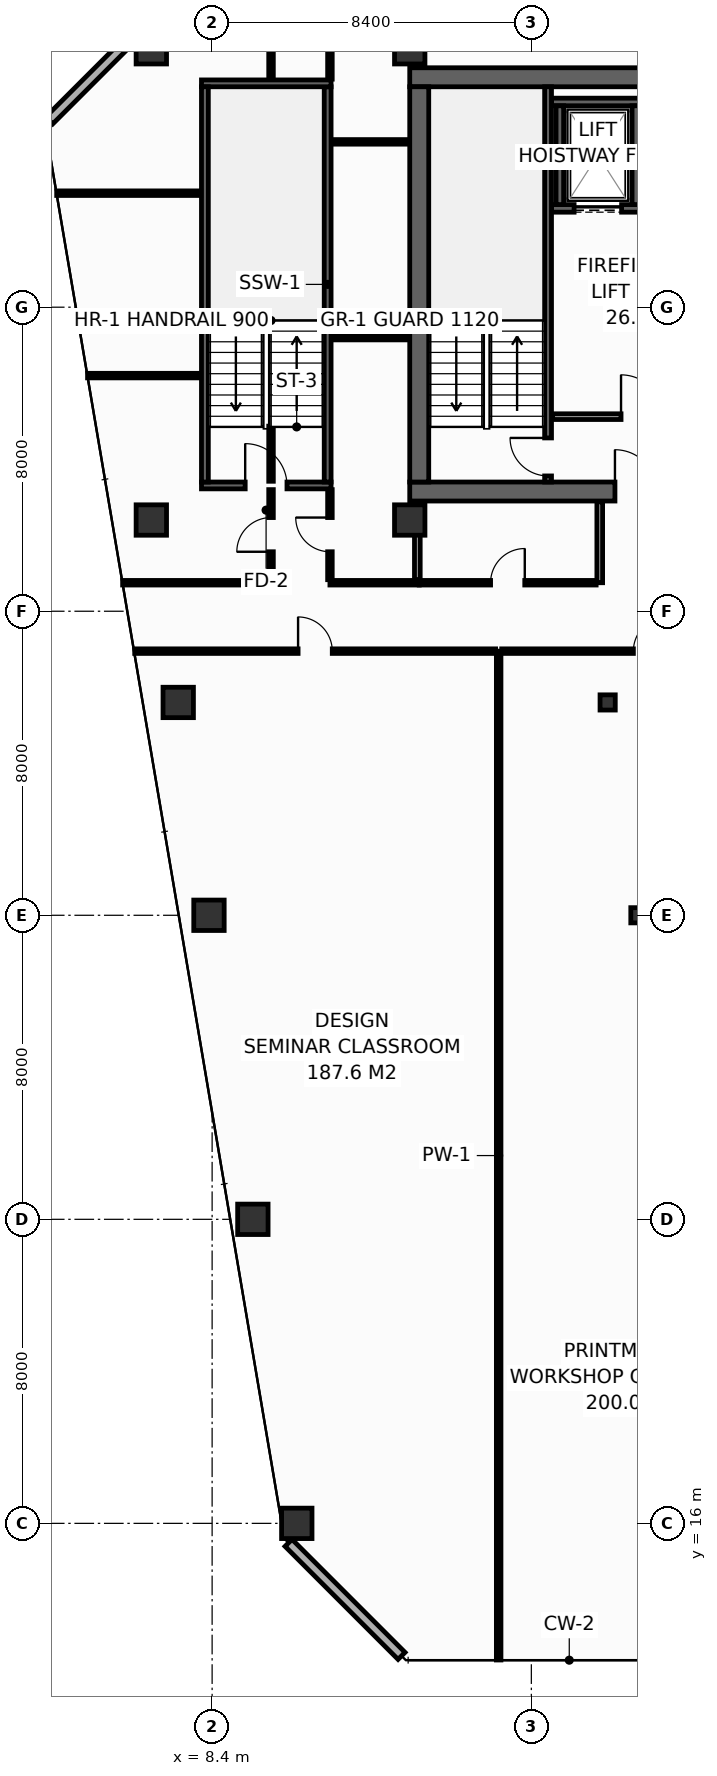
"""IFC4 building model, lengths in metres.
Left out: names, types, materials, properties, quantities, classifications, styles, units other than length and angle.
Written with IfcOpenShell. Run it as: python <this file> out.ifc"""

import sys

from ifc_helpers import new_model, si_unit, direction, frame, frame_2d, origin, origin_2d, place, context, subcontext, project, spatial, rectangle, hollow_rectangle, extrude, element, fill, save


model = new_model("IFC4")
c1 = context("Model", 3, precision=1e-05, world=origin(), true_north=direction((0.0, 1.0)))
c2 = subcontext(c1, "Body", "Model", "MODEL_VIEW")
j1 = project(units=[si_unit("LENGTHUNIT", "METRE"), si_unit("PLANEANGLEUNIT", "RADIAN")], contexts=[c1])
p1 = place(None, origin())
s1 = spatial("IfcSite", under=j1, at=p1, CompositionType="ELEMENT")
p2 = place(p1, origin())
s2 = spatial("IfcBuilding", under=s1, at=p2, CompositionType="ELEMENT")
p3 = place(p2, frame((0.0, 0.0, 213.2)))
s3 = spatial("IfcBuildingStorey", under=s2, at=p3, CompositionType="ELEMENT", Elevation=213.2)
p4 = place(p3, frame((13.6, 43.15, 0.0), z_axis=(0.0, 0.0, 1.0), x_axis=(1.0, 0.0, 0.0)))
e1 = element("IfcWall", 1, at=p4, inside=s3, PredefinedType="SHEAR", context=c2, shape_type="SweptSolid", body=[
    extrude(rectangle(XDim=32.7, YDim=0.5, at=frame_2d((16.35, 0.0))), origin(), (0.0, 0.0, 1.0), 3.55),
])
p5 = place(p4, frame((5.4, 0.0, 0.0)))
e2 = element("IfcOpeningElement", 2, at=p5, cuts=e1, PredefinedType="OPENING", context=c2, shape_type="SweptSolid", body=[
    extrude(rectangle(XDim=1.1, YDim=2.15, at=frame_2d((0.55, 1.075))), frame((0.0, 0.26, 0.0), z_axis=(0.0, -1.0, 0.0), x_axis=(1.0, 0.0, 0.0)), (0.0, 0.0, 1.0), 0.52),
])
p6 = place(p4, frame((25.6, 0.0, 0.0)))
e3 = element("IfcOpeningElement", 3, at=p6, cuts=e1, PredefinedType="OPENING", context=c2, shape_type="SweptSolid", body=[
    extrude(rectangle(XDim=1.1, YDim=2.15, at=frame_2d((0.55, 1.075))), frame((0.0, 0.26, 0.0), z_axis=(0.0, -1.0, 0.0), x_axis=(1.0, 0.0, 0.0)), (0.0, 0.0, 1.0), 0.52),
])
p7 = place(p3, frame((13.6, 54.05, 0.0), z_axis=(0.0, 0.0, 1.0), x_axis=(1.0, 0.0, 0.0)))
e4 = element("IfcWall", 4, at=p7, inside=s3, PredefinedType="SHEAR", context=c2, shape_type="SweptSolid", body=[
    extrude(rectangle(XDim=32.7, YDim=0.5, at=frame_2d((16.35, 0.0))), origin(), (0.0, 0.0, 1.0), 3.55),
])
p8 = place(p3, frame((13.85, 43.4, 0.0), z_axis=(0.0, 0.0, 1.0), x_axis=(0.0, 1.0, 0.0)))
e5 = element("IfcWall", 5, at=p8, inside=s3, PredefinedType="SHEAR", context=c2, shape_type="SweptSolid", body=[
    extrude(rectangle(XDim=10.4, YDim=0.5, at=frame_2d((5.2, 0.0))), origin(), (0.0, 0.0, 1.0), 3.55),
])
for number, where, z_axis, x_axis in (
    (6, (6.8, 54.8, 0.0), (0.0, 0.0, 1.0), (1.0, 0.0, 0.0)),
    (7, (13.6, 54.8, 0.0), (0.0, 0.0, 1.0), (1.0, 0.0, 0.0)),
    (8, (6.8, 42.4, 0.0), (0.0, 0.0, 1.0), (1.0, 0.0, 0.0)),
    (9, (13.6, 42.4, 0.0), (0.0, 0.0, 1.0), (1.0, 0.0, 0.0)),
    (10, (10.628, 16.0, 0.0), (0.0, 0.0, 1.0), (1.0, 0.0, 0.0)),
    (11, (9.472, 24.0, 0.0), (0.0, 0.0, 1.0), (1.0, 0.0, 0.0)),
    (12, (8.317, 32.0, 0.0), (0.0, 0.0, 1.0), (1.0, 0.0, 0.0)),
):
    element("IfcColumn", number, at=place(p3, frame(where, z_axis=z_axis, x_axis=x_axis)), inside=s3, PredefinedType="COLUMN", context=c2, shape_type="SweptSolid", body=[
        extrude(hollow_rectangle(XDim=0.8, YDim=0.8, WallThickness=0.036, at=origin_2d()), origin(), (0.0, 0.0, 1.0), 3.8),
    ])
p9 = place(p3, frame((19.617, 32.0, 0.0), z_axis=(0.0, 0.0, 1.0), x_axis=(1.0, 0.0, 0.0)))
e13 = element("IfcColumn", 13, at=p9, inside=s3, PredefinedType="COLUMN", context=c2, shape_type="SweptSolid", body=[
    extrude(hollow_rectangle(XDim=0.4, YDim=0.4, WallThickness=0.016, at=origin_2d()), origin(), (0.0, 0.0, 1.0), 3.8),
])
p10 = place(p3, frame((7.508, 37.6, 0.0), z_axis=(0.0, 0.0, 1.0), x_axis=(1.0, 0.0, 0.0)))
e14 = element("IfcColumn", 14, at=p10, inside=s3, PredefinedType="COLUMN", context=c2, shape_type="SweptSolid", body=[
    extrude(hollow_rectangle(XDim=0.8, YDim=0.8, WallThickness=0.036, at=origin_2d()), origin(), (0.0, 0.0, 1.0), 3.8),
])
p11 = place(p3, frame((18.808, 37.6, 0.0), z_axis=(0.0, 0.0, 1.0), x_axis=(1.0, 0.0, 0.0)))
e15 = element("IfcColumn", 15, at=p11, inside=s3, PredefinedType="COLUMN", context=c2, shape_type="SweptSolid", body=[
    extrude(hollow_rectangle(XDim=0.4, YDim=0.4, WallThickness=0.016, at=origin_2d()), origin(), (0.0, 0.0, 1.0), 3.8),
])
p12 = place(p3, frame((17.33, 50.6, 0.0), z_axis=(0.0, 0.0, 1.0), x_axis=(1.0, 0.0, 0.0)))
e16 = element("IfcWall", 16, at=p12, inside=s3, PredefinedType="SHEAR", context=c2, shape_type="SweptSolid", body=[
    extrude(rectangle(XDim=2.52, YDim=0.2, at=frame_2d((1.26, 0.0))), origin(), (0.0, 0.0, 1.0), 3.55),
])
p13 = place(p12, frame((0.595, 0.0, 0.0)))
e17 = element("IfcOpeningElement", 17, at=p13, cuts=e16, PredefinedType="OPENING", context=c2, shape_type="SweptSolid", body=[
    extrude(rectangle(XDim=1.25, YDim=2.3, at=frame_2d((0.625, 1.15))), frame((0.0, 0.11, 0.0), z_axis=(0.0, -1.0, 0.0), x_axis=(1.0, 0.0, 0.0)), (0.0, 0.0, 1.0), 0.22),
])
p14 = place(p3, frame((17.33, 53.4, 0.0), z_axis=(0.0, 0.0, 1.0), x_axis=(1.0, 0.0, 0.0)))
e18 = element("IfcWall", 18, at=p14, inside=s3, PredefinedType="SHEAR", context=c2, shape_type="SweptSolid", body=[
    extrude(rectangle(XDim=2.52, YDim=0.2, at=frame_2d((1.26, 0.0))), origin(), (0.0, 0.0, 1.0), 3.55),
])
for number, where, z_axis, x_axis in (
    (19, (17.55, 50.7, 0.0), (0.0, 0.0, 1.0), (0.0, 1.0, 0.0)),
    (20, (19.55, 50.7, 0.0), (0.0, 0.0, 1.0), (0.0, 1.0, 0.0)),
):
    element("IfcWall", number, at=place(p3, frame(where, z_axis=z_axis, x_axis=x_axis)), inside=s3, PredefinedType="SHEAR", context=c2, shape_type="SweptSolid", body=[
        extrude(rectangle(XDim=2.6, YDim=0.2, at=frame_2d((1.3, 0.0))), origin(), (0.0, 0.0, 1.0), 3.55),
    ])
p15 = place(p3, frame((17.24, 43.4, 0.0), z_axis=(0.0, 0.0, 1.0), x_axis=(0.0, 1.0, 0.0)))
e21 = element("IfcWall", 21, at=p15, inside=s3, PredefinedType="SHEAR", context=c2, shape_type="SweptSolid", body=[
    extrude(rectangle(XDim=10.4, YDim=0.18, at=frame_2d((5.2, 0.0))), origin(), (0.0, 0.0, 1.0), 3.55),
])
p16 = place(p15, frame((0.16, 0.0, 0.0)))
e22 = element("IfcOpeningElement", 22, at=p16, cuts=e21, PredefinedType="OPENING", context=c2, shape_type="SweptSolid", body=[
    extrude(rectangle(XDim=1.0, YDim=2.15, at=frame_2d((0.5, 1.075))), frame((0.0, 0.1, 0.0), z_axis=(0.0, -1.0, 0.0), x_axis=(1.0, 0.0, 0.0)), (0.0, 0.0, 1.0), 0.2),
])
p17 = place(p3, frame((8.12, 43.31, 0.0), z_axis=(0.0, 0.0, 1.0), x_axis=(1.0, 0.0, 0.0)))
e23 = element("IfcWall", 23, at=p17, inside=s3, PredefinedType="SHEAR", context=c2, shape_type="SweptSolid", body=[
    extrude(rectangle(XDim=3.41, YDim=0.18, at=frame_2d((1.705, 0.0))), origin(), (0.0, 0.0, 1.0), 3.55),
])
p18 = place(p17, frame((1.15, 0.0, 0.0)))
e24 = element("IfcOpeningElement", 24, at=p18, cuts=e23, PredefinedType="OPENING", context=c2, shape_type="SweptSolid", body=[
    extrude(rectangle(XDim=1.1, YDim=2.15, at=frame_2d((0.55, 1.075))), frame((0.0, 0.1, 0.0), z_axis=(0.0, -1.0, 0.0), x_axis=(1.0, 0.0, 0.0)), (0.0, 0.0, 1.0), 0.2),
])
p19 = place(p3, frame((11.44, 43.4, 0.0), z_axis=(0.0, 0.0, 1.0), x_axis=(0.0, 1.0, 0.0)))
e25 = element("IfcWall", 25, at=p19, inside=s3, PredefinedType="SHEAR", context=c2, shape_type="SweptSolid", body=[
    extrude(rectangle(XDim=10.4, YDim=0.18, at=frame_2d((5.2, 0.0))), origin(), (0.0, 0.0, 1.0), 3.55),
])
p20 = place(p3, frame((11.53, 53.89, 0.0), z_axis=(0.0, 0.0, 1.0), x_axis=(-1.0, 0.0, 0.0)))
e26 = element("IfcWall", 26, at=p20, inside=s3, PredefinedType="SHEAR", context=c2, shape_type="SweptSolid", body=[
    extrude(rectangle(XDim=3.41, YDim=0.18, at=frame_2d((1.705, 0.0))), origin(), (0.0, 0.0, 1.0), 3.55),
])
p21 = place(p3, frame((8.21, 53.8, 0.0), z_axis=(0.0, 0.0, 1.0), x_axis=(0.0, -1.0, 0.0)))
e27 = element("IfcWall", 27, at=p21, inside=s3, PredefinedType="SHEAR", context=c2, shape_type="SweptSolid", body=[
    extrude(rectangle(XDim=10.4, YDim=0.18, at=frame_2d((5.2, 0.0))), origin(), (0.0, 0.0, 1.0), 3.55),
])
p22 = place(p3, frame((17.36, 45.12, 0.0), z_axis=(0.0, 0.0, 1.0), x_axis=(1.0, 0.0, 0.0)))
e28 = element("IfcWall", 28, at=p22, inside=s3, PredefinedType="PARTITIONING", context=c2, shape_type="SweptSolid", body=[
    extrude(rectangle(XDim=5.14, YDim=0.15, at=frame_2d((2.57, 0.0))), origin(), (0.0, 0.0, 1.0), 3.55),
])
p23 = place(p22, frame((1.8, 0.0, 0.0)))
e29 = element("IfcOpeningElement", 29, at=p23, cuts=e28, PredefinedType="OPENING", context=c2, shape_type="SweptSolid", body=[
    extrude(rectangle(XDim=1.1, YDim=2.15, at=frame_2d((0.55, 1.075))), frame((0.0, 0.085, 0.0), z_axis=(0.0, -1.0, 0.0), x_axis=(1.0, 0.0, 0.0)), (0.0, 0.0, 1.0), 0.17),
])
p24 = place(p3, frame((10.411, 15.487, 0.0), z_axis=(0.0, 0.0, 1.0), x_axis=(0.707135806771, -0.70707775441, 0.0)))
e30 = element("IfcWall", 30, at=p24, inside=s3, PredefinedType="STANDARD", context=c2, shape_type="SweptSolid", body=[
    extrude(rectangle(XDim=4.206, YDim=0.26, at=frame_2d((2.103, 0.0))), origin(), (0.0, 0.0, 1.0), 3.55),
])
p25 = place(p3, frame((7.087, 55.887, 0.0), z_axis=(0.0, 0.0, 1.0), x_axis=(-0.707106781187, -0.707106781187, 0.0)))
e31 = element("IfcWall", 31, at=p25, inside=s3, PredefinedType="STANDARD", context=c2, shape_type="SweptSolid", body=[
    extrude(rectangle(XDim=4.206, YDim=0.26, at=frame_2d((2.103, 0.0))), origin(), (0.0, 0.0, 1.0), 3.55),
])
p26 = place(p3, frame((6.045, 40.75, 0.0), z_axis=(0.0, 0.0, 1.0), x_axis=(1.0, 0.0, 0.0)))
e32 = element("IfcWall", 32, at=p26, inside=s3, PredefinedType="PARTITIONING", context=c2, shape_type="SweptSolid", body=[
    extrude(rectangle(XDim=3.905, YDim=0.12, at=frame_2d((1.952, 0.0))), origin(), (0.0, 0.0, 1.0), 3.035),
])
p27 = place(p3, frame((11.5, 40.75, 0.0), z_axis=(0.0, 0.0, 1.0), x_axis=(1.0, 0.0, 0.0)))
e33 = element("IfcWall", 33, at=p27, inside=s3, PredefinedType="PARTITIONING", context=c2, shape_type="SweptSolid", body=[
    extrude(rectangle(XDim=2.35, YDim=0.12, at=frame_2d((1.175, 0.0))), origin(), (0.0, 0.0, 1.0), 3.55),
])
p28 = place(p3, frame((11.55, 52.35, 0.0), z_axis=(0.0, 0.0, 1.0), x_axis=(1.0, 0.0, 0.0)))
e34 = element("IfcWall", 34, at=p28, inside=s3, PredefinedType="PARTITIONING", context=c2, shape_type="SweptSolid", body=[
    extrude(rectangle(XDim=2.03, YDim=0.12, at=frame_2d((1.015, 0.0))), origin(), (0.0, 0.0, 1.0), 3.55),
])
p29 = place(p3, frame((11.5, 54.0, 0.0), z_axis=(0.0, 0.0, 1.0), x_axis=(0.0, 1.0, 0.0)))
e35 = element("IfcWall", 35, at=p29, inside=s3, PredefinedType="PARTITIONING", context=c2, shape_type="SweptSolid", body=[
    extrude(rectangle(XDim=1.995, YDim=0.12, at=frame_2d((0.998, 0.0))), origin(), (0.0, 0.0, 1.0), 2.935),
])
p30 = place(p3, frame((5.122, 46.2, 0.0), z_axis=(0.0, 0.0, 1.0), x_axis=(1.0, 0.0, 0.0)))
e36 = element("IfcWall", 36, at=p30, inside=s3, PredefinedType="PARTITIONING", context=c2, shape_type="SweptSolid", body=[
    extrude(rectangle(XDim=2.978, YDim=0.12, at=frame_2d((1.489, 0.0))), origin(), (0.0, 0.0, 1.0), 2.835),
])
p31 = place(p3, frame((4.31, 51.0, 0.0), z_axis=(0.0, 0.0, 1.0), x_axis=(1.0, 0.0, 0.0)))
e37 = element("IfcWall", 37, at=p31, inside=s3, PredefinedType="PARTITIONING", context=c2, shape_type="SweptSolid", body=[
    extrude(rectangle(XDim=3.79, YDim=0.12, at=frame_2d((1.895, 0.0))), origin(), (0.0, 0.0, 1.0), 2.835),
])
p32 = place(p3, frame((9.95, 40.83, 0.0), z_axis=(0.0, 0.0, 1.0), x_axis=(0.0, 1.0, 0.0)))
e38 = element("IfcWall", 38, at=p32, inside=s3, PredefinedType="PARTITIONING", context=c2, shape_type="SweptSolid", body=[
    extrude(rectangle(XDim=2.37, YDim=0.12, at=frame_2d((1.185, 0.0))), origin(), (0.0, 0.0, 1.0), 2.835),
])
p33 = place(p32, frame((0.735, 0.0, 0.0)))
e39 = element("IfcOpeningElement", 39, at=p33, cuts=e38, PredefinedType="OPENING", context=c2, shape_type="SweptSolid", body=[
    extrude(rectangle(XDim=0.9, YDim=2.1, at=frame_2d((0.45, 1.05))), frame((0.0, 0.07, 0.0), z_axis=(0.0, -1.0, 0.0), x_axis=(1.0, 0.0, 0.0)), (0.0, 0.0, 1.0), 0.14),
])
p34 = place(p3, frame((9.95, 43.42, 0.0), z_axis=(0.0, 0.0, 1.0), x_axis=(0.0, 1.0, 0.0)))
e40 = element("IfcWall", 40, at=p34, inside=s3, PredefinedType="PARTITIONING", context=c2, shape_type="SweptSolid", body=[
    extrude(rectangle(XDim=1.45, YDim=0.12, at=frame_2d((0.725, 0.0))), origin(), (0.0, 0.0, 1.0), 3.55),
])
p35 = place(p3, frame((9.95, 54.0, 0.0), z_axis=(0.0, 0.0, 1.0), x_axis=(0.0, 1.0, 0.0)))
e41 = element("IfcWall", 41, at=p35, inside=s3, PredefinedType="PARTITIONING", context=c2, shape_type="SweptSolid", body=[
    extrude(rectangle(XDim=1.995, YDim=0.12, at=frame_2d((0.998, 0.0))), origin(), (0.0, 0.0, 1.0), 2.935),
])
p36 = place(p3, frame((11.55, 47.2, 0.0), z_axis=(0.0, 0.0, 1.0), x_axis=(1.0, 0.0, 0.0)))
e42 = element("IfcWall", 42, at=p36, inside=s3, PredefinedType="PARTITIONING", context=c2, shape_type="SweptSolid", body=[
    extrude(rectangle(XDim=2.03, YDim=0.12, at=frame_2d((1.015, 0.0))), origin(), (0.0, 0.0, 1.0), 3.55),
])
p37 = place(p3, frame((11.5, 40.83, 0.0), z_axis=(0.0, 0.0, 1.0), x_axis=(0.0, 1.0, 0.0)))
e43 = element("IfcWall", 43, at=p37, inside=s3, PredefinedType="PARTITIONING", context=c2, shape_type="SweptSolid", body=[
    extrude(rectangle(XDim=2.37, YDim=0.12, at=frame_2d((1.185, 0.0))), origin(), (0.0, 0.0, 1.0), 2.835),
])
p38 = place(p37, frame((0.735, 0.0, 0.0)))
e44 = element("IfcOpeningElement", 44, at=p38, cuts=e43, PredefinedType="OPENING", context=c2, shape_type="SweptSolid", body=[
    extrude(rectangle(XDim=0.9, YDim=2.1, at=frame_2d((0.45, 1.05))), frame((0.0, 0.07, 0.0), z_axis=(0.0, -1.0, 0.0), x_axis=(1.0, 0.0, 0.0)), (0.0, 0.0, 1.0), 0.14),
])
p39 = place(p3, frame((13.8, 40.83, 0.0), z_axis=(0.0, 0.0, 1.0), x_axis=(0.0, 1.0, 0.0)))
e45 = element("IfcWall", 45, at=p39, inside=s3, PredefinedType="PARTITIONING", context=c2, shape_type="SweptSolid", body=[
    extrude(rectangle(XDim=2.05, YDim=0.15, at=frame_2d((1.025, 0.0))), origin(), (0.0, 0.0, 1.0), 3.55),
])
p40 = place(p3, frame((18.6, 40.75, 0.0), z_axis=(0.0, 0.0, 1.0), x_axis=(0.0, 1.0, 0.0)))
e46 = element("IfcWall", 46, at=p40, inside=s3, PredefinedType="PARTITIONING", context=c2, shape_type="SweptSolid", body=[
    extrude(rectangle(XDim=2.13, YDim=0.15, at=frame_2d((1.065, 0.0))), origin(), (0.0, 0.0, 1.0), 3.55),
])
p41 = place(p3, frame((13.85, 40.75, 0.0), z_axis=(0.0, 0.0, 1.0), x_axis=(1.0, 0.0, 0.0)))
e47 = element("IfcWall", 47, at=p41, inside=s3, PredefinedType="PARTITIONING", context=c2, shape_type="SweptSolid", body=[
    extrude(rectangle(XDim=4.655, YDim=0.12, at=frame_2d((2.327, 0.0))), origin(), (0.0, 0.0, 1.0), 3.55),
])
p42 = place(p41, frame((1.877, 0.0, 0.0)))
e48 = element("IfcOpeningElement", 48, at=p42, cuts=e47, PredefinedType="OPENING", context=c2, shape_type="SweptSolid", body=[
    extrude(rectangle(XDim=0.9, YDim=2.1, at=frame_2d((0.45, 1.05))), frame((0.0, 0.07, 0.0), z_axis=(0.0, -1.0, 0.0), x_axis=(1.0, 0.0, 0.0)), (0.0, 0.0, 1.0), 0.14),
])
p43 = place(p3, frame((15.94, 12.405, 0.0), z_axis=(0.0, 0.0, 1.0), x_axis=(0.0, 1.0, 0.0)))
e49 = element("IfcWall", 49, at=p43, inside=s3, PredefinedType="PARTITIONING", context=c2, shape_type="SweptSolid", body=[
    extrude(rectangle(XDim=26.545, YDim=0.12, at=frame_2d((13.272, 0.0))), origin(), (0.0, 0.0, 1.0), 2.835),
])
p44 = place(p3, frame((6.363, 38.95, 0.0), z_axis=(0.0, 0.0, 1.0), x_axis=(1.0, 0.0, 0.0)))
e50 = element("IfcWall", 50, at=p44, inside=s3, PredefinedType="PARTITIONING", context=c2, shape_type="SweptSolid", body=[
    extrude(rectangle(XDim=9.497, YDim=0.12, at=frame_2d((4.749, 0.0))), origin(), (0.0, 0.0, 1.0), 3.035),
])
p45 = place(p44, frame((4.299, 0.0, 0.0)))
e51 = element("IfcOpeningElement", 51, at=p45, cuts=e50, PredefinedType="OPENING", context=c2, shape_type="SweptSolid", body=[
    extrude(rectangle(XDim=0.9, YDim=2.1, at=frame_2d((0.45, 1.05))), frame((0.0, 0.07, 0.0), z_axis=(0.0, -1.0, 0.0), x_axis=(1.0, 0.0, 0.0)), (0.0, 0.0, 1.0), 0.14),
])
p46 = place(p3, frame((16.02, 38.95, 0.0), z_axis=(0.0, 0.0, 1.0), x_axis=(1.0, 0.0, 0.0)))
e52 = element("IfcWall", 52, at=p46, inside=s3, PredefinedType="PARTITIONING", context=c2, shape_type="SweptSolid", body=[
    extrude(rectangle(XDim=7.83, YDim=0.12, at=frame_2d((3.915, 0.0))), origin(), (0.0, 0.0, 1.0), 2.835),
])
p47 = place(p46, frame((3.465, 0.0, 0.0)))
e53 = element("IfcOpeningElement", 53, at=p47, cuts=e52, PredefinedType="OPENING", context=c2, shape_type="SweptSolid", body=[
    extrude(rectangle(XDim=0.9, YDim=2.1, at=frame_2d((0.45, 1.05))), frame((0.0, 0.07, 0.0), z_axis=(0.0, -1.0, 0.0), x_axis=(1.0, 0.0, 0.0)), (0.0, 0.0, 1.0), 0.14),
])
p48 = place(p13, origin())
e54 = element("IfcDoor", 54, at=p48, inside=s3, OperationType="SLIDING_TO_LEFT", PredefinedType="DOOR", context=c2, shape_type="SweptSolid", body=[
    extrude(rectangle(XDim=1.25, YDim=2.3, at=frame_2d((0.625, 1.15))), frame((0.0, 0.025, 0.0), z_axis=(0.0, -1.0, 0.0), x_axis=(1.0, 0.0, 0.0)), (0.0, 0.0, 1.0), 0.05),
])
fill(e17, e54)
p49 = place(p16, origin())
e55 = element("IfcDoor", 55, at=p49, inside=s3, OperationType="SINGLE_SWING_RIGHT", PredefinedType="DOOR", context=c2, shape_type="SweptSolid", body=[
    extrude(rectangle(XDim=1.0, YDim=2.15, at=frame_2d((0.5, 1.075))), frame((0.0, 0.025, 0.0), z_axis=(0.0, -1.0, 0.0), x_axis=(1.0, 0.0, 0.0)), (0.0, 0.0, 1.0), 0.05),
])
fill(e22, e55)
p50 = place(p18, origin())
e56 = element("IfcDoor", 56, at=p50, inside=s3, OperationType="SINGLE_SWING_LEFT", PredefinedType="DOOR", context=c2, shape_type="SweptSolid", body=[
    extrude(rectangle(XDim=1.1, YDim=2.15, at=frame_2d((0.55, 1.075))), frame((0.0, 0.025, 0.0), z_axis=(0.0, -1.0, 0.0), x_axis=(1.0, 0.0, 0.0)), (0.0, 0.0, 1.0), 0.05),
])
fill(e24, e56)
p51 = place(p23, origin())
e57 = element("IfcDoor", 57, at=p51, inside=s3, OperationType="SINGLE_SWING_LEFT", PredefinedType="DOOR", context=c2, shape_type="SweptSolid", body=[
    extrude(rectangle(XDim=1.1, YDim=2.15, at=frame_2d((0.55, 1.075))), frame((0.0, 0.025, 0.0), z_axis=(0.0, -1.0, 0.0), x_axis=(1.0, 0.0, 0.0)), (0.0, 0.0, 1.0), 0.05),
])
fill(e29, e57)
p52 = place(p5, origin())
e58 = element("IfcDoor", 58, at=p52, inside=s3, OperationType="SINGLE_SWING_LEFT", PredefinedType="DOOR", context=c2, shape_type="SweptSolid", body=[
    extrude(rectangle(XDim=1.1, YDim=2.15, at=frame_2d((0.55, 1.075))), frame((0.0, 0.025, 0.0), z_axis=(0.0, -1.0, 0.0), x_axis=(1.0, 0.0, 0.0)), (0.0, 0.0, 1.0), 0.05),
])
fill(e2, e58)
p53 = place(p33, origin())
e59 = element("IfcDoor", 59, at=p53, inside=s3, OperationType="SINGLE_SWING_LEFT", PredefinedType="DOOR", context=c2, shape_type="SweptSolid", body=[
    extrude(rectangle(XDim=0.9, YDim=2.1, at=frame_2d((0.45, 1.05))), frame((0.0, 0.025, 0.0), z_axis=(0.0, -1.0, 0.0), x_axis=(1.0, 0.0, 0.0)), (0.0, 0.0, 1.0), 0.05),
])
fill(e39, e59)
p54 = place(p38, origin())
e60 = element("IfcDoor", 60, at=p54, inside=s3, OperationType="SINGLE_SWING_RIGHT", PredefinedType="DOOR", context=c2, shape_type="SweptSolid", body=[
    extrude(rectangle(XDim=0.9, YDim=2.1, at=frame_2d((0.45, 1.05))), frame((0.0, 0.025, 0.0), z_axis=(0.0, -1.0, 0.0), x_axis=(1.0, 0.0, 0.0)), (0.0, 0.0, 1.0), 0.05),
])
fill(e44, e60)
p55 = place(p42, origin())
e61 = element("IfcDoor", 61, at=p55, inside=s3, OperationType="SINGLE_SWING_RIGHT", PredefinedType="DOOR", context=c2, shape_type="SweptSolid", body=[
    extrude(rectangle(XDim=0.9, YDim=2.1, at=frame_2d((0.45, 1.05))), frame((0.0, 0.025, 0.0), z_axis=(0.0, -1.0, 0.0), x_axis=(1.0, 0.0, 0.0)), (0.0, 0.0, 1.0), 0.05),
])
fill(e48, e61)
p56 = place(p45, origin())
e62 = element("IfcDoor", 62, at=p56, inside=s3, OperationType="SINGLE_SWING_LEFT", PredefinedType="DOOR", context=c2, shape_type="SweptSolid", body=[
    extrude(rectangle(XDim=0.9, YDim=2.1, at=frame_2d((0.45, 1.05))), frame((0.0, 0.025, 0.0), z_axis=(0.0, -1.0, 0.0), x_axis=(1.0, 0.0, 0.0)), (0.0, 0.0, 1.0), 0.05),
])
fill(e51, e62)
p57 = place(p47, origin())
e63 = element("IfcDoor", 63, at=p57, inside=s3, OperationType="SINGLE_SWING_RIGHT", PredefinedType="DOOR", context=c2, shape_type="SweptSolid", body=[
    extrude(rectangle(XDim=0.9, YDim=2.1, at=frame_2d((0.45, 1.05))), frame((0.0, 0.025, 0.0), z_axis=(0.0, -1.0, 0.0), x_axis=(1.0, 0.0, 0.0)), (0.0, 0.0, 1.0), 0.05),
])
fill(e53, e63)
save(model, sys.argv[1])
